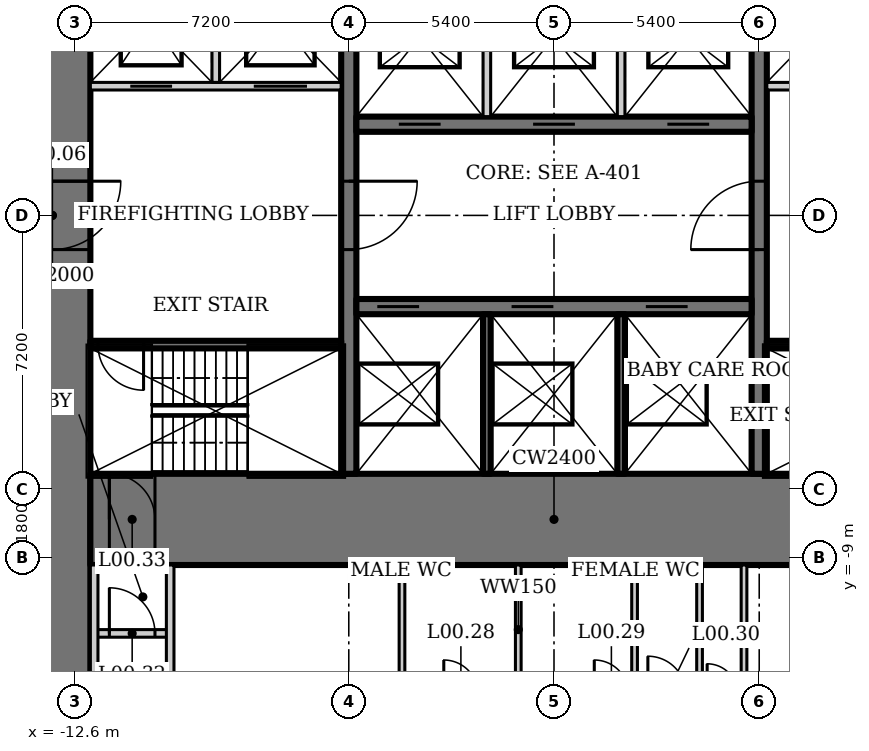
"""IFC4 building model, lengths in metres.
Left out: names, types, materials, properties, quantities, classifications, styles, units other than length and angle.
Written with IfcOpenShell. Run it as: python <this file> out.ifc"""

import sys

from ifc_helpers import new_model, si_unit, direction, frame, frame_2d, origin, place, context, subcontext, project, spatial, rectangle, extrude, element, fill, save


model = new_model("IFC4")
c1 = context("Model", 3, precision=1e-05, world=origin(), true_north=direction((0.0, 1.0)))
c2 = subcontext(c1, "Body", "Model", "MODEL_VIEW")
j1 = project(units=[si_unit("LENGTHUNIT", "METRE"), si_unit("PLANEANGLEUNIT", "RADIAN")], contexts=[c1])
p1 = place(None, origin())
s1 = spatial("IfcSite", under=j1, at=p1, CompositionType="ELEMENT")
p2 = place(p1, origin())
s2 = spatial("IfcBuilding", under=s1, at=p2, CompositionType="ELEMENT")
p3 = place(p2, origin())
s3 = spatial("IfcBuildingStorey", under=s2, at=p3, CompositionType="ELEMENT", Elevation=0.0)
p4 = place(p3, frame((-13.2, 13.0, 0.0), z_axis=(0.0, 0.0, 1.0), x_axis=(0.0, -1.0, 0.0)))
e1 = element("IfcWall", 1, at=p4, inside=s3, PredefinedType="SHEAR", context=c2, shape_type="SweptSolid", body=[
    extrude(rectangle(XDim=26.0, YDim=2.0, at=frame_2d((13.0, 0.0))), origin(), (0.0, 0.0, 1.0), 6.5),
])
p5 = place(p4, frame((12.1, 0.0, 0.0)))
e2 = element("IfcOpeningElement", 2, at=p5, cuts=e1, PredefinedType="OPENING", context=c2, shape_type="SweptSolid", body=[
    extrude(rectangle(XDim=1.8, YDim=2.1, at=frame_2d((0.9, 1.05))), frame((0.0, 1.01, 0.0), z_axis=(0.0, -1.0, 0.0), x_axis=(1.0, 0.0, 0.0)), (0.0, 0.0, 1.0), 2.02),
])
p6 = place(p3, frame((-12.2, -8.0, 0.0), z_axis=(0.0, 0.0, 1.0), x_axis=(1.0, 0.0, 0.0)))
e3 = element("IfcWall", 3, at=p6, inside=s3, PredefinedType="SHEAR", context=c2, shape_type="SweptSolid", body=[
    extrude(rectangle(XDim=24.4, YDim=2.4, at=frame_2d((12.2, 0.0))), origin(), (0.0, 0.0, 1.0), 6.5),
])
p7 = place(p6, frame((0.5, 0.0, 0.0)))
e4 = element("IfcOpeningElement", 4, at=p7, cuts=e3, PredefinedType="OPENING", context=c2, shape_type="SweptSolid", body=[
    extrude(rectangle(XDim=1.2, YDim=2.1, at=frame_2d((0.6, 1.05))), frame((0.0, 1.21, 0.0), z_axis=(0.0, -1.0, 0.0), x_axis=(1.0, 0.0, 0.0)), (0.0, 0.0, 1.0), 2.42),
])
p8 = place(p6, frame((22.7, 0.0, 0.0)))
e5 = element("IfcOpeningElement", 5, at=p8, cuts=e3, PredefinedType="OPENING", context=c2, shape_type="SweptSolid", body=[
    extrude(rectangle(XDim=1.2, YDim=2.1, at=frame_2d((0.6, 1.05))), frame((0.0, 1.21, 0.0), z_axis=(0.0, -1.0, 0.0), x_axis=(1.0, 0.0, 0.0)), (0.0, 0.0, 1.0), 2.42),
])
p9 = place(p3, frame((5.4, -6.8, 0.0), z_axis=(0.0, 0.0, 1.0), x_axis=(0.0, 1.0, 0.0)))
e6 = element("IfcWall", 6, at=p9, inside=s3, PredefinedType="SHEAR", context=c2, shape_type="SweptSolid", body=[
    extrude(rectangle(XDim=13.6, YDim=0.4, at=frame_2d((6.8, 0.0))), origin(), (0.0, 0.0, 1.0), 6.5),
])
p10 = place(p9, frame((5.9, 0.0, 0.0)))
e7 = element("IfcOpeningElement", 7, at=p10, cuts=e6, PredefinedType="OPENING", context=c2, shape_type="SweptSolid", body=[
    extrude(rectangle(XDim=1.8, YDim=2.1, at=frame_2d((0.9, 1.05))), frame((0.0, 0.21, 0.0), z_axis=(0.0, -1.0, 0.0), x_axis=(1.0, 0.0, 0.0)), (0.0, 0.0, 1.0), 0.42),
])
p11 = place(p3, frame((-5.4, 6.8, 0.0), z_axis=(0.0, 0.0, 1.0), x_axis=(0.0, -1.0, 0.0)))
e8 = element("IfcWall", 8, at=p11, inside=s3, PredefinedType="SHEAR", context=c2, shape_type="SweptSolid", body=[
    extrude(rectangle(XDim=13.6, YDim=0.4, at=frame_2d((6.8, 0.0))), origin(), (0.0, 0.0, 1.0), 6.5),
])
p12 = place(p11, frame((5.9, 0.0, 0.0)))
e9 = element("IfcOpeningElement", 9, at=p12, cuts=e8, PredefinedType="OPENING", context=c2, shape_type="SweptSolid", body=[
    extrude(rectangle(XDim=1.8, YDim=2.1, at=frame_2d((0.9, 1.05))), frame((0.0, 0.21, 0.0), z_axis=(0.0, -1.0, 0.0), x_axis=(1.0, 0.0, 0.0)), (0.0, 0.0, 1.0), 0.42),
])
p13 = place(p3, frame((-5.2, -2.4, 0.0), z_axis=(0.0, 0.0, 1.0), x_axis=(1.0, 0.0, 0.0)))
e10 = element("IfcWall", 10, at=p13, inside=s3, PredefinedType="SHEAR", context=c2, shape_type="SweptSolid", body=[
    extrude(rectangle(XDim=10.4, YDim=0.4, at=frame_2d((5.2, 0.0))), origin(), (0.0, 0.0, 1.0), 6.5),
])
p14 = place(p13, frame((0.55, 0.0, 0.0)))
e11 = element("IfcOpeningElement", 11, at=p14, cuts=e10, PredefinedType="OPENING", context=c2, shape_type="SweptSolid", body=[
    extrude(rectangle(XDim=1.1, YDim=2.2, at=frame_2d((0.55, 1.1))), frame((0.0, 0.21, 0.0), z_axis=(0.0, -1.0, 0.0), x_axis=(1.0, 0.0, 0.0)), (0.0, 0.0, 1.0), 0.42),
])
p15 = place(p13, frame((4.083, 0.0, 0.0)))
e12 = element("IfcOpeningElement", 12, at=p15, cuts=e10, PredefinedType="OPENING", context=c2, shape_type="SweptSolid", body=[
    extrude(rectangle(XDim=1.1, YDim=2.2, at=frame_2d((0.55, 1.1))), frame((0.0, 0.21, 0.0), z_axis=(0.0, -1.0, 0.0), x_axis=(1.0, 0.0, 0.0)), (0.0, 0.0, 1.0), 0.42),
])
p16 = place(p13, frame((7.617, 0.0, 0.0)))
e13 = element("IfcOpeningElement", 13, at=p16, cuts=e10, PredefinedType="OPENING", context=c2, shape_type="SweptSolid", body=[
    extrude(rectangle(XDim=1.1, YDim=2.2, at=frame_2d((0.55, 1.1))), frame((0.0, 0.21, 0.0), z_axis=(0.0, -1.0, 0.0), x_axis=(1.0, 0.0, 0.0)), (0.0, 0.0, 1.0), 0.42),
])
for number, where, z_axis, x_axis in (
    (14, (-1.767, -2.6, 0.0), (0.0, 0.0, 1.0), (0.0, -1.0, 0.0)),
    (15, (1.767, -2.6, 0.0), (0.0, 0.0, 1.0), (0.0, -1.0, 0.0)),
):
    element("IfcWall", number, at=place(p3, frame(where, z_axis=z_axis, x_axis=x_axis)), inside=s3, PredefinedType="SOLIDWALL", context=c2, shape_type="SweptSolid", body=[
        extrude(rectangle(XDim=4.2, YDim=0.2, at=frame_2d((2.1, 0.0))), origin(), (0.0, 0.0, 1.0), 6.5),
    ])
p17 = place(p3, frame((5.2, 2.4, 0.0), z_axis=(0.0, 0.0, 1.0), x_axis=(-1.0, 0.0, 0.0)))
e16 = element("IfcWall", 16, at=p17, inside=s3, PredefinedType="SHEAR", context=c2, shape_type="SweptSolid", body=[
    extrude(rectangle(XDim=10.4, YDim=0.4, at=frame_2d((5.2, 0.0))), origin(), (0.0, 0.0, 1.0), 6.5),
])
p18 = place(p17, frame((8.183, 0.0, 0.0)))
e17 = element("IfcOpeningElement", 17, at=p18, cuts=e16, PredefinedType="OPENING", context=c2, shape_type="SweptSolid", body=[
    extrude(rectangle(XDim=1.1, YDim=2.2, at=frame_2d((0.55, 1.1))), frame((0.0, 0.21, 0.0), z_axis=(0.0, -1.0, 0.0), x_axis=(1.0, 0.0, 0.0)), (0.0, 0.0, 1.0), 0.42),
])
p19 = place(p17, frame((4.65, 0.0, 0.0)))
e18 = element("IfcOpeningElement", 18, at=p19, cuts=e16, PredefinedType="OPENING", context=c2, shape_type="SweptSolid", body=[
    extrude(rectangle(XDim=1.1, YDim=2.2, at=frame_2d((0.55, 1.1))), frame((0.0, 0.21, 0.0), z_axis=(0.0, -1.0, 0.0), x_axis=(1.0, 0.0, 0.0)), (0.0, 0.0, 1.0), 0.42),
])
p20 = place(p17, frame((1.117, 0.0, 0.0)))
e19 = element("IfcOpeningElement", 19, at=p20, cuts=e16, PredefinedType="OPENING", context=c2, shape_type="SweptSolid", body=[
    extrude(rectangle(XDim=1.1, YDim=2.2, at=frame_2d((0.55, 1.1))), frame((0.0, 0.21, 0.0), z_axis=(0.0, -1.0, 0.0), x_axis=(1.0, 0.0, 0.0)), (0.0, 0.0, 1.0), 0.42),
])
for number, where, z_axis, x_axis in (
    (20, (-1.767, 2.6, 0.0), (0.0, 0.0, 1.0), (0.0, 1.0, 0.0)),
    (21, (1.767, 2.6, 0.0), (0.0, 0.0, 1.0), (0.0, 1.0, 0.0)),
):
    element("IfcWall", number, at=place(p3, frame(where, z_axis=z_axis, x_axis=x_axis)), inside=s3, PredefinedType="SOLIDWALL", context=c2, shape_type="SweptSolid", body=[
        extrude(rectangle(XDim=4.2, YDim=0.2, at=frame_2d((2.1, 0.0))), origin(), (0.0, 0.0, 1.0), 6.5),
    ])
p21 = place(p3, frame((5.6, -3.4, 0.0), z_axis=(0.0, 0.0, 1.0), x_axis=(1.0, 0.0, 0.0)))
e22 = element("IfcWall", 22, at=p21, inside=s3, PredefinedType="SHEAR", context=c2, shape_type="SweptSolid", body=[
    extrude(rectangle(XDim=6.6, YDim=0.2, at=frame_2d((3.3, 0.0))), origin(), (0.0, 0.0, 1.0), 6.5),
])
p22 = place(p21, frame((5.2, 0.0, 0.0)))
e23 = element("IfcOpeningElement", 23, at=p22, cuts=e22, PredefinedType="OPENING", context=c2, shape_type="SweptSolid", body=[
    extrude(rectangle(XDim=1.2, YDim=2.1, at=frame_2d((0.6, 1.05))), frame((0.0, 0.11, 0.0), z_axis=(0.0, -1.0, 0.0), x_axis=(1.0, 0.0, 0.0)), (0.0, 0.0, 1.0), 0.22),
])
p23 = place(p3, frame((12.2, 3.4, 0.0), z_axis=(0.0, 0.0, 1.0), x_axis=(-1.0, 0.0, 0.0)))
e24 = element("IfcWall", 24, at=p23, inside=s3, PredefinedType="SOLIDWALL", context=c2, shape_type="SweptSolid", body=[
    extrude(rectangle(XDim=6.6, YDim=0.2, at=frame_2d((3.3, 0.0))), origin(), (0.0, 0.0, 1.0), 6.5),
])
p24 = place(p23, frame((4.45, 0.0, 0.0)))
e25 = element("IfcOpeningElement", 25, at=p24, cuts=e24, PredefinedType="OPENING", context=c2, shape_type="SweptSolid", body=[
    extrude(rectangle(XDim=1.1, YDim=2.2, at=frame_2d((0.55, 1.1))), frame((0.0, 0.11, 0.0), z_axis=(0.0, -1.0, 0.0), x_axis=(1.0, 0.0, 0.0)), (0.0, 0.0, 1.0), 0.22),
])
p25 = place(p23, frame((0.9, 0.0, 0.0)))
e26 = element("IfcOpeningElement", 26, at=p25, cuts=e24, PredefinedType="OPENING", context=c2, shape_type="SweptSolid", body=[
    extrude(rectangle(XDim=1.4, YDim=2.2, at=frame_2d((0.7, 1.1))), frame((0.0, 0.11, 0.0), z_axis=(0.0, -1.0, 0.0), x_axis=(1.0, 0.0, 0.0)), (0.0, 0.0, 1.0), 0.22),
])
p26 = place(p3, frame((-5.6, -3.4, 0.0), z_axis=(0.0, 0.0, 1.0), x_axis=(-1.0, 0.0, 0.0)))
e27 = element("IfcWall", 27, at=p26, inside=s3, PredefinedType="SHEAR", context=c2, shape_type="SweptSolid", body=[
    extrude(rectangle(XDim=6.6, YDim=0.2, at=frame_2d((3.3, 0.0))), origin(), (0.0, 0.0, 1.0), 6.5),
])
p27 = place(p26, frame((5.2, 0.0, 0.0)))
e28 = element("IfcOpeningElement", 28, at=p27, cuts=e27, PredefinedType="OPENING", context=c2, shape_type="SweptSolid", body=[
    extrude(rectangle(XDim=1.2, YDim=2.1, at=frame_2d((0.6, 1.05))), frame((0.0, 0.11, 0.0), z_axis=(0.0, -1.0, 0.0), x_axis=(1.0, 0.0, 0.0)), (0.0, 0.0, 1.0), 0.22),
])
p28 = place(p3, frame((-12.2, 3.4, 0.0), z_axis=(0.0, 0.0, 1.0), x_axis=(1.0, 0.0, 0.0)))
e29 = element("IfcWall", 29, at=p28, inside=s3, PredefinedType="SOLIDWALL", context=c2, shape_type="SweptSolid", body=[
    extrude(rectangle(XDim=6.6, YDim=0.2, at=frame_2d((3.3, 0.0))), origin(), (0.0, 0.0, 1.0), 6.5),
])
p29 = place(p28, frame((1.05, 0.0, 0.0)))
e30 = element("IfcOpeningElement", 30, at=p29, cuts=e29, PredefinedType="OPENING", context=c2, shape_type="SweptSolid", body=[
    extrude(rectangle(XDim=1.1, YDim=2.2, at=frame_2d((0.55, 1.1))), frame((0.0, 0.11, 0.0), z_axis=(0.0, -1.0, 0.0), x_axis=(1.0, 0.0, 0.0)), (0.0, 0.0, 1.0), 0.22),
])
p30 = place(p28, frame((4.3, 0.0, 0.0)))
e31 = element("IfcOpeningElement", 31, at=p30, cuts=e29, PredefinedType="OPENING", context=c2, shape_type="SweptSolid", body=[
    extrude(rectangle(XDim=1.4, YDim=2.2, at=frame_2d((0.7, 1.1))), frame((0.0, 0.11, 0.0), z_axis=(0.0, -1.0, 0.0), x_axis=(1.0, 0.0, 0.0)), (0.0, 0.0, 1.0), 0.22),
])
p31 = place(p3, frame((-8.9, 3.5, 0.0), z_axis=(0.0, 0.0, 1.0), x_axis=(0.0, 1.0, 0.0)))
e32 = element("IfcWall", 32, at=p31, inside=s3, PredefinedType="SOLIDWALL", context=c2, shape_type="SweptSolid", body=[
    extrude(rectangle(XDim=3.3, YDim=0.2, at=frame_2d((1.65, 0.0))), origin(), (0.0, 0.0, 1.0), 6.5),
])
for number, where, z_axis, x_axis in (
    (33, (-4.0, -9.2, 0.0), (0.0, 0.0, 1.0), (0.0, -1.0, 0.0)),
    (34, (5.0, -9.2, 0.0), (0.0, 0.0, 1.0), (0.0, -1.0, 0.0)),
    (35, (-0.94, -9.2, 0.0), (0.0, 0.0, 1.0), (0.0, -1.0, 0.0)),
):
    element("IfcWall", number, at=place(p3, frame(where, z_axis=z_axis, x_axis=x_axis)), inside=s3, PredefinedType="SOLIDWALL", context=c2, shape_type="SweptSolid", body=[
        extrude(rectangle(XDim=3.4, YDim=0.15, at=frame_2d((1.7, 0.0))), origin(), (0.0, 0.0, 1.0), 6.3),
    ])
p32 = place(p3, frame((2.12, -9.2, 0.0), z_axis=(0.0, 0.0, 1.0), x_axis=(0.0, -1.0, 0.0)))
e36 = element("IfcWall", 36, at=p32, inside=s3, PredefinedType="SOLIDWALL", context=c2, shape_type="SweptSolid", body=[
    extrude(rectangle(XDim=3.4, YDim=0.15, at=frame_2d((1.7, 0.0))), origin(), (0.0, 0.0, 1.0), 5.378),
])
p33 = place(p3, frame((3.83, -9.2, 0.0), z_axis=(0.0, 0.0, 1.0), x_axis=(0.0, -1.0, 0.0)))
e37 = element("IfcWall", 37, at=p33, inside=s3, PredefinedType="SOLIDWALL", context=c2, shape_type="SweptSolid", body=[
    extrude(rectangle(XDim=3.4, YDim=0.15, at=frame_2d((1.7, 0.0))), origin(), (0.0, 0.0, 1.0), 6.3),
])
p34 = place(p3, frame((-12.1, -11.0, 0.0), z_axis=(0.0, 0.0, 1.0), x_axis=(1.0, 0.0, 0.0)))
e38 = element("IfcWall", 38, at=p34, inside=s3, PredefinedType="SOLIDWALL", context=c2, shape_type="SweptSolid", body=[
    extrude(rectangle(XDim=2.0, YDim=0.2, at=frame_2d((1.0, 0.0))), origin(), (0.0, 0.0, 1.0), 6.3),
])
p35 = place(p34, frame((0.4, 0.0, 0.0)))
e39 = element("IfcOpeningElement", 39, at=p35, cuts=e38, PredefinedType="OPENING", context=c2, shape_type="SweptSolid", body=[
    extrude(rectangle(XDim=1.2, YDim=2.1, at=frame_2d((0.6, 1.05))), frame((0.0, 0.11, 0.0), z_axis=(0.0, -1.0, 0.0), x_axis=(1.0, 0.0, 0.0)), (0.0, 0.0, 1.0), 0.22),
])
p36 = place(p3, frame((-12.1, -9.2, 0.0), z_axis=(0.0, 0.0, 1.0), x_axis=(0.0, -1.0, 0.0)))
e40 = element("IfcWall", 40, at=p36, inside=s3, PredefinedType="SOLIDWALL", context=c2, shape_type="SweptSolid", body=[
    extrude(rectangle(XDim=10.946, YDim=0.2, at=frame_2d((5.473, 0.0))), origin(), (0.0, 0.0, 1.0), 6.3),
])
p37 = place(p3, frame((-10.1, -18.884, 0.0), z_axis=(0.0, 0.0, 1.0), x_axis=(0.0, 1.0, 0.0)))
e41 = element("IfcWall", 41, at=p37, inside=s3, PredefinedType="SOLIDWALL", context=c2, shape_type="SweptSolid", body=[
    extrude(rectangle(XDim=9.684, YDim=0.2, at=frame_2d((4.842, 0.0))), origin(), (0.0, 0.0, 1.0), 6.3),
])
p38 = place(p10, origin())
e42 = element("IfcDoor", 42, at=p38, inside=s3, OperationType="DOUBLE_DOOR_DOUBLE_SWING", PredefinedType="DOOR", context=c2, shape_type="SweptSolid", body=[
    extrude(rectangle(XDim=1.8, YDim=2.1, at=frame_2d((0.9, 1.05))), frame((0.0, 0.025, 0.0), z_axis=(0.0, -1.0, 0.0), x_axis=(1.0, 0.0, 0.0)), (0.0, 0.0, 1.0), 0.05),
])
fill(e7, e42)
p39 = place(p12, origin())
e43 = element("IfcDoor", 43, at=p39, inside=s3, OperationType="DOUBLE_DOOR_DOUBLE_SWING", PredefinedType="DOOR", context=c2, shape_type="SweptSolid", body=[
    extrude(rectangle(XDim=1.8, YDim=2.1, at=frame_2d((0.9, 1.05))), frame((0.0, 0.025, 0.0), z_axis=(0.0, -1.0, 0.0), x_axis=(1.0, 0.0, 0.0)), (0.0, 0.0, 1.0), 0.05),
])
fill(e9, e43)
p40 = place(p27, origin())
e44 = element("IfcDoor", 44, at=p40, inside=s3, OperationType="SINGLE_SWING_RIGHT", PredefinedType="DOOR", context=c2, shape_type="SweptSolid", body=[
    extrude(rectangle(XDim=1.2, YDim=2.1, at=frame_2d((0.6, 1.05))), frame((0.0, 0.025, 0.0), z_axis=(0.0, -1.0, 0.0), x_axis=(1.0, 0.0, 0.0)), (0.0, 0.0, 1.0), 0.05),
])
fill(e28, e44)
p41 = place(p5, origin())
e45 = element("IfcDoor", 45, at=p41, inside=s3, OperationType="DOUBLE_DOOR_DOUBLE_SWING", PredefinedType="DOOR", context=c2, shape_type="SweptSolid", body=[
    extrude(rectangle(XDim=1.8, YDim=2.1, at=frame_2d((0.9, 1.05))), frame((0.0, 0.025, 0.0), z_axis=(0.0, -1.0, 0.0), x_axis=(1.0, 0.0, 0.0)), (0.0, 0.0, 1.0), 0.05),
])
fill(e2, e45)
p42 = place(p18, origin())
e46 = element("IfcDoor", 46, at=p42, inside=s3, OperationType="DOUBLE_DOOR_SLIDING", PredefinedType="DOOR", context=c2, shape_type="SweptSolid", body=[
    extrude(rectangle(XDim=1.1, YDim=2.2, at=frame_2d((0.55, 1.1))), frame((0.0, 0.025, 0.0), z_axis=(0.0, -1.0, 0.0), x_axis=(1.0, 0.0, 0.0)), (0.0, 0.0, 1.0), 0.05),
])
fill(e17, e46)
p43 = place(p14, origin())
e47 = element("IfcDoor", 47, at=p43, inside=s3, OperationType="DOUBLE_DOOR_SLIDING", PredefinedType="DOOR", context=c2, shape_type="SweptSolid", body=[
    extrude(rectangle(XDim=1.1, YDim=2.2, at=frame_2d((0.55, 1.1))), frame((0.0, 0.025, 0.0), z_axis=(0.0, -1.0, 0.0), x_axis=(1.0, 0.0, 0.0)), (0.0, 0.0, 1.0), 0.05),
])
fill(e11, e47)
p44 = place(p19, origin())
e48 = element("IfcDoor", 48, at=p44, inside=s3, OperationType="DOUBLE_DOOR_SLIDING", PredefinedType="DOOR", context=c2, shape_type="SweptSolid", body=[
    extrude(rectangle(XDim=1.1, YDim=2.2, at=frame_2d((0.55, 1.1))), frame((0.0, 0.025, 0.0), z_axis=(0.0, -1.0, 0.0), x_axis=(1.0, 0.0, 0.0)), (0.0, 0.0, 1.0), 0.05),
])
fill(e18, e48)
p45 = place(p15, origin())
e49 = element("IfcDoor", 49, at=p45, inside=s3, OperationType="DOUBLE_DOOR_SLIDING", PredefinedType="DOOR", context=c2, shape_type="SweptSolid", body=[
    extrude(rectangle(XDim=1.1, YDim=2.2, at=frame_2d((0.55, 1.1))), frame((0.0, 0.025, 0.0), z_axis=(0.0, -1.0, 0.0), x_axis=(1.0, 0.0, 0.0)), (0.0, 0.0, 1.0), 0.05),
])
fill(e12, e49)
p46 = place(p20, origin())
e50 = element("IfcDoor", 50, at=p46, inside=s3, OperationType="DOUBLE_DOOR_SLIDING", PredefinedType="DOOR", context=c2, shape_type="SweptSolid", body=[
    extrude(rectangle(XDim=1.1, YDim=2.2, at=frame_2d((0.55, 1.1))), frame((0.0, 0.025, 0.0), z_axis=(0.0, -1.0, 0.0), x_axis=(1.0, 0.0, 0.0)), (0.0, 0.0, 1.0), 0.05),
])
fill(e19, e50)
p47 = place(p16, origin())
e51 = element("IfcDoor", 51, at=p47, inside=s3, OperationType="DOUBLE_DOOR_SLIDING", PredefinedType="DOOR", context=c2, shape_type="SweptSolid", body=[
    extrude(rectangle(XDim=1.1, YDim=2.2, at=frame_2d((0.55, 1.1))), frame((0.0, 0.025, 0.0), z_axis=(0.0, -1.0, 0.0), x_axis=(1.0, 0.0, 0.0)), (0.0, 0.0, 1.0), 0.05),
])
fill(e13, e51)
p48 = place(p29, origin())
e52 = element("IfcDoor", 52, at=p48, inside=s3, OperationType="DOUBLE_DOOR_SLIDING", PredefinedType="DOOR", context=c2, shape_type="SweptSolid", body=[
    extrude(rectangle(XDim=1.1, YDim=2.2, at=frame_2d((0.55, 1.1))), frame((0.0, 0.025, 0.0), z_axis=(0.0, -1.0, 0.0), x_axis=(1.0, 0.0, 0.0)), (0.0, 0.0, 1.0), 0.05),
])
fill(e30, e52)
p49 = place(p30, origin())
e53 = element("IfcDoor", 53, at=p49, inside=s3, OperationType="DOUBLE_DOOR_SLIDING", PredefinedType="DOOR", context=c2, shape_type="SweptSolid", body=[
    extrude(rectangle(XDim=1.4, YDim=2.2, at=frame_2d((0.7, 1.1))), frame((0.0, 0.025, 0.0), z_axis=(0.0, -1.0, 0.0), x_axis=(1.0, 0.0, 0.0)), (0.0, 0.0, 1.0), 0.05),
])
fill(e31, e53)
p50 = place(p35, origin())
e54 = element("IfcDoor", 54, at=p50, inside=s3, OperationType="SINGLE_SWING_RIGHT", PredefinedType="DOOR", context=c2, shape_type="SweptSolid", body=[
    extrude(rectangle(XDim=1.2, YDim=2.1, at=frame_2d((0.6, 1.05))), frame((0.0, 0.025, 0.0), z_axis=(0.0, -1.0, 0.0), x_axis=(1.0, 0.0, 0.0)), (0.0, 0.0, 1.0), 0.05),
])
fill(e39, e54)
p51 = place(p7, origin())
e55 = element("IfcDoor", 55, at=p51, inside=s3, OperationType="SINGLE_SWING_LEFT", PredefinedType="DOOR", context=c2, shape_type="SweptSolid", body=[
    extrude(rectangle(XDim=1.2, YDim=2.1, at=frame_2d((0.6, 1.05))), frame((0.0, 0.025, 0.0), z_axis=(0.0, -1.0, 0.0), x_axis=(1.0, 0.0, 0.0)), (0.0, 0.0, 1.0), 0.05),
])
fill(e4, e55)
save(model, sys.argv[1])
